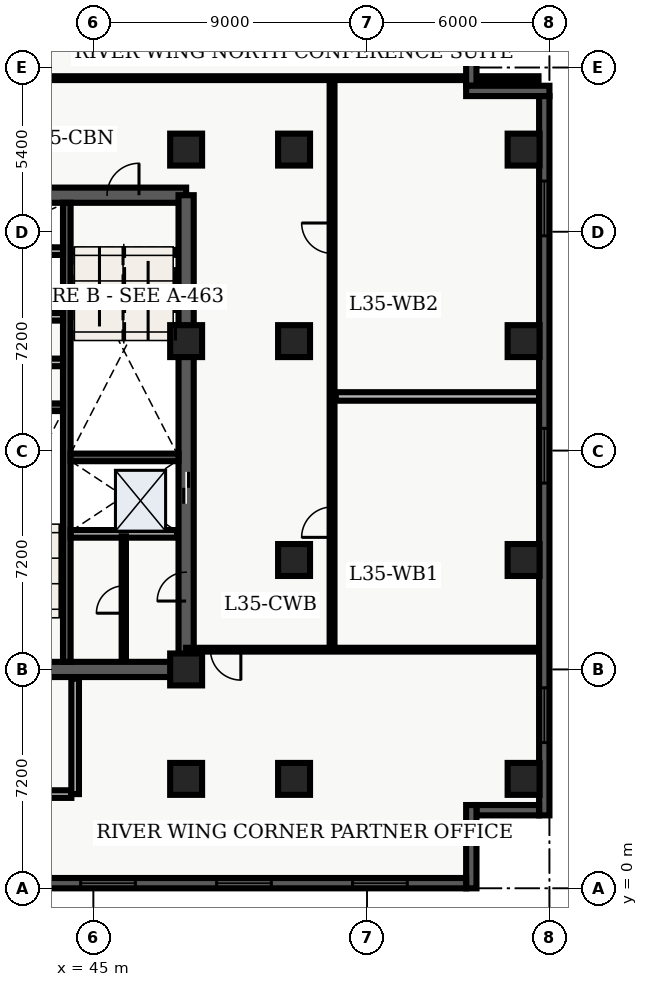
"""IFC4 building model, lengths in metres.
Left out: names, types, materials, properties, quantities, classifications, styles, units other than length and angle.
Written with IfcOpenShell. Run it as: python <this file> out.ifc"""

import sys

from ifc_helpers import new_model, entity, si_unit, converted_unit, direction, frame, origin_with_axes, origin_2d_with_axis, place, context, subcontext, project, spatial, polyline, rectangle, outline, extrude, element, fill, save


model = new_model("IFC4")
c1 = context("Model", 3, precision=1e-05, world=origin_with_axes(), true_north=direction((0.0, 1.0)))
c2 = subcontext(c1, "Body", "Model", "MODEL_VIEW")
j1 = project(units=[si_unit("LENGTHUNIT", "METRE"), converted_unit("PLANEANGLEUNIT", "DEGREE", entity("IfcPlaneAngleMeasure", 0.017), si_unit("PLANEANGLEUNIT", "RADIAN"), dimensions=[0, 0, 0, 0, 0, 0, 0])], contexts=[c1])
p1 = place(None, origin_with_axes())
s1 = spatial("IfcSite", under=j1, at=p1, CompositionType="ELEMENT")
p2 = place(p1, origin_with_axes())
s2 = spatial("IfcBuilding", under=s1, at=p2, CompositionType="ELEMENT")
p3 = place(p2, frame((0.0, 0.0, 144.6), z_axis=(0.0, 0.0, 1.0), x_axis=(1.0, 0.0, 0.0)))
s3 = spatial("IfcBuildingStorey", under=s2, at=p3, CompositionType="ELEMENT", Elevation=144.6)
p4 = place(p3, frame((40.2, 7.2, 0.0), z_axis=(0.0, 0.0, 1.0), x_axis=(1.0, 0.0, 0.0)))
e1 = element("IfcWall", 1, at=p4, inside=s3, PredefinedType="SHEAR", context=c2, shape_type="SweptSolid", body=[
    extrude(outline(polyline([(0.0, -0.25), (7.85, -0.25), (7.85, 0.25), (0.0, 0.25), (0.0, -0.25)])), origin_with_axes(), (0.0, 0.0, 1.0), 3.66),
])
p5 = place(p4, frame((2.175, 0.0, 0.0), z_axis=(0.0, 0.0, 1.0), x_axis=(1.0, 0.0, 0.0)))
e2 = element("IfcOpeningElement", 2, at=p5, cuts=e1, PredefinedType="OPENING", context=c2, shape_type="SweptSolid", body=[
    extrude(rectangle(XDim=1.05, YDim=0.52, at=origin_2d_with_axis()), origin_with_axes(), (0.0, 0.0, 1.0), 2.15),
])
p6 = place(p3, frame((40.2, 22.8, 0.0), z_axis=(0.0, 0.0, 1.0), x_axis=(1.0, 0.0, 0.0)))
e3 = element("IfcWall", 3, at=p6, inside=s3, PredefinedType="SHEAR", context=c2, shape_type="SweptSolid", body=[
    extrude(outline(polyline([(0.0, -0.25), (7.85, -0.25), (7.85, 0.25), (0.0, 0.25), (0.0, -0.25)])), origin_with_axes(), (0.0, 0.0, 1.0), 3.66),
])
p7 = place(p6, frame((5.775, 0.0, 0.0), z_axis=(0.0, 0.0, 1.0), x_axis=(1.0, 0.0, 0.0)))
e4 = element("IfcOpeningElement", 4, at=p7, cuts=e3, PredefinedType="OPENING", context=c2, shape_type="SweptSolid", body=[
    extrude(rectangle(XDim=1.05, YDim=0.52, at=origin_2d_with_axis()), origin_with_axes(), (0.0, 0.0, 1.0), 2.15),
])
p8 = place(p3, frame((48.05, 7.2, 0.0), z_axis=(0.0, 0.0, 1.0), x_axis=(0.0, 1.0, 0.0)))
e5 = element("IfcWall", 5, at=p8, inside=s3, PredefinedType="SHEAR", context=c2, shape_type="SweptSolid", body=[
    extrude(outline(polyline([(0.0, -0.25), (15.6, -0.25), (15.6, 0.25), (0.0, 0.25), (0.0, -0.25)])), origin_with_axes(), (0.0, 0.0, 1.0), 3.66),
])
p9 = place(p8, frame((5.975, 0.0, 0.0), z_axis=(0.0, 0.0, 1.0), x_axis=(1.0, 0.0, 0.0)))
e6 = element("IfcOpeningElement", 6, at=p9, cuts=e5, PredefinedType="OPENING", context=c2, shape_type="SweptSolid", body=[
    extrude(rectangle(XDim=1.05, YDim=0.52, at=origin_2d_with_axis()), origin_with_axes(), (0.0, 0.0, 1.0), 2.15),
])
p10 = place(p8, frame((2.725, 0.0, 0.0), z_axis=(0.0, 0.0, 1.0), x_axis=(1.0, 0.0, 0.0)))
e7 = element("IfcOpeningElement", 7, at=p10, cuts=e5, PredefinedType="OPENING", context=c2, shape_type="SweptSolid", body=[
    extrude(rectangle(XDim=0.95, YDim=0.52, at=origin_2d_with_axis()), origin_with_axes(), (0.0, 0.0, 1.0), 2.15),
])
p11 = place(p3, frame((44.125, 7.45, 0.0), z_axis=(0.0, 0.0, 1.0), x_axis=(0.0, 1.0, 0.0)))
e8 = element("IfcWall", 8, at=p11, inside=s3, PredefinedType="SHEAR", context=c2, shape_type="SweptSolid", body=[
    extrude(outline(polyline([(0.0, -0.125), (15.1, -0.125), (15.1, 0.125), (0.0, 0.125), (0.0, -0.125)])), origin_with_axes(), (0.0, 0.0, 1.0), 3.66),
])
for number, where, z_axis, x_axis in (
    (9, (40.45, 15.825, 0.0), (0.0, 0.0, 1.0), (1.0, 0.0, 0.0)),
    (10, (44.25, 14.175, 0.0), (0.0, 0.0, 1.0), (1.0, 0.0, 0.0)),
):
    element("IfcWall", number, at=place(p3, frame(where, z_axis=z_axis, x_axis=x_axis)), inside=s3, PredefinedType="SHEAR", context=c2, shape_type="SweptSolid", body=[
        extrude(outline(polyline([(0.0, -0.125), (3.55, -0.125), (3.55, 0.125), (0.0, 0.125), (0.0, -0.125)])), origin_with_axes(), (0.0, 0.0, 1.0), 3.66),
    ])
p12 = place(p3, frame((40.5, 17.3, 0.0), z_axis=(0.0, 0.0, 1.0), x_axis=(1.0, 0.0, 0.0)))
e11 = element("IfcWall", 11, at=p12, inside=s3, PredefinedType="SOLIDWALL", context=c2, shape_type="SweptSolid", body=[
    extrude(outline(polyline([(0.0, -0.125), (3.5, -0.125), (3.5, 0.125), (0.0, 0.125), (0.0, -0.125)])), origin_with_axes(), (0.0, 0.0, 1.0), 2.7),
])
p13 = place(p12, frame((2.4, 0.0, 0.0), z_axis=(0.0, 0.0, 1.0), x_axis=(1.0, 0.0, 0.0)))
e12 = element("IfcOpeningElement", 12, at=p13, cuts=e11, PredefinedType="OPENING", context=c2, shape_type="SweptSolid", body=[
    extrude(rectangle(XDim=0.9, YDim=0.27, at=origin_2d_with_axis()), origin_with_axes(), (0.0, 0.0, 1.0), 2.15),
])
p14 = place(p3, frame((40.5, 18.8, 0.0), z_axis=(0.0, 0.0, 1.0), x_axis=(1.0, 0.0, 0.0)))
e13 = element("IfcWall", 13, at=p14, inside=s3, PredefinedType="SOLIDWALL", context=c2, shape_type="SweptSolid", body=[
    extrude(outline(polyline([(0.0, -0.125), (3.5, -0.125), (3.5, 0.125), (0.0, 0.125), (0.0, -0.125)])), origin_with_axes(), (0.0, 0.0, 1.0), 2.7),
])
p15 = place(p3, frame((40.325, 3.1, 0.0), z_axis=(0.0, 0.0, 1.0), x_axis=(1.0, 0.0, 0.0)))
e14 = element("IfcWall", 14, at=p15, inside=s3, PredefinedType="SOLIDWALL", context=c2, shape_type="SweptSolid", body=[
    extrude(outline(polyline([(0.0, -0.125), (3.95, -0.125), (3.95, 0.125), (0.0, 0.125), (0.0, -0.125)])), origin_with_axes(), (0.0, 0.0, 1.0), 2.7),
])
p16 = place(p3, frame((44.4, 3.1, 0.0), z_axis=(0.0, 0.0, 1.0), x_axis=(0.0, 1.0, 0.0)))
e15 = element("IfcWall", 15, at=p16, inside=s3, PredefinedType="SOLIDWALL", context=c2, shape_type="SweptSolid", body=[
    extrude(outline(polyline([(0.0, -0.125), (3.8, -0.125), (3.8, 0.125), (0.0, 0.125), (0.0, -0.125)])), origin_with_axes(), (0.0, 0.0, 1.0), 2.7),
])
for number, where, z_axis, x_axis in (
    (16, (48.05, 3.6, 0.0), (0.0, 0.0, 1.0), (1.0, 0.0, 0.0)),
    (17, (48.05, 7.2, 0.0), (0.0, 0.0, 1.0), (1.0, 0.0, 0.0)),
    (18, (48.05, 18.0, 0.0), (0.0, 0.0, 1.0), (1.0, 0.0, 0.0)),
    (19, (48.05, 24.3, 0.0), (0.0, 0.0, 1.0), (1.0, 0.0, 0.0)),
    (20, (51.6, 3.6, 0.0), (0.0, 0.0, 1.0), (1.0, 0.0, 0.0)),
    (21, (51.6, 10.8, 0.0), (0.0, 0.0, 1.0), (1.0, 0.0, 0.0)),
    (22, (51.6, 18.0, 0.0), (0.0, 0.0, 1.0), (1.0, 0.0, 0.0)),
    (23, (51.6, 24.3, 0.0), (0.0, 0.0, 1.0), (1.0, 0.0, 0.0)),
    (24, (59.15, 3.6, 0.0), (0.0, 0.0, 1.0), (1.0, 0.0, 0.0)),
    (25, (59.15, 10.8, 0.0), (0.0, 0.0, 1.0), (1.0, 0.0, 0.0)),
    (26, (59.15, 18.0, 0.0), (0.0, 0.0, 1.0), (1.0, 0.0, 0.0)),
    (27, (59.15, 24.3, 0.0), (0.0, 0.0, 1.0), (1.0, 0.0, 0.0)),
):
    element("IfcColumn", number, at=place(p3, frame(where, z_axis=z_axis, x_axis=x_axis)), inside=s3, PredefinedType="COLUMN", context=c2, shape_type="SweptSolid", body=[
        extrude(rectangle(XDim=1.05, YDim=1.05, at=origin_2d_with_axis()), origin_with_axes(), (0.0, 0.0, 1.0), 3.9),
    ])
for number, where, z_axis, x_axis in (
    (28, (40.5, 20.96, 0.0), (0.0, 0.0, 1.0), (1.0, 0.0, 0.0)),
    (29, (44.25, 11.66, 0.0), (0.0, 0.0, 1.0), (1.0, 0.0, 0.0)),
):
    element("IfcWall", number, at=place(p3, frame(where, z_axis=z_axis, x_axis=x_axis)), inside=s3, PredefinedType="SOLIDWALL", context=c2, shape_type="SweptSolid", body=[
        extrude(outline(polyline([(0.0, -0.125), (3.5, -0.125), (3.5, 0.125), (0.0, 0.125), (0.0, -0.125)])), origin_with_axes(), (0.0, 0.0, 1.0), 2.7),
    ])
p17 = place(p3, frame((46.0, 7.5, 0.0), z_axis=(0.0, 0.0, 1.0), x_axis=(0.0, 1.0, 0.0)))
e30 = element("IfcWall", 30, at=p17, inside=s3, PredefinedType="PARTITIONING", context=c2, shape_type="SweptSolid", body=[
    extrude(outline(polyline([(0.0, -0.07), (4.08, -0.07), (4.08, 0.07), (0.0, 0.07), (0.0, -0.07)])), origin_with_axes(), (0.0, 0.0, 1.0), 2.7),
])
p18 = place(p17, frame((2.0, 0.0, 0.0), z_axis=(0.0, 0.0, 1.0), x_axis=(1.0, 0.0, 0.0)))
e31 = element("IfcOpeningElement", 31, at=p18, cuts=e30, PredefinedType="OPENING", context=c2, shape_type="SweptSolid", body=[
    extrude(rectangle(XDim=0.9, YDim=0.16, at=origin_2d_with_axis()), origin_with_axes(), (0.0, 0.0, 1.0), 2.15),
])
p19 = place(p3, frame((52.85, 7.85, 0.0), z_axis=(0.0, 0.0, 1.0), x_axis=(0.0, 1.0, 0.0)))
e32 = element("IfcWall", 32, at=p19, inside=s3, PredefinedType="PARTITIONING", context=c2, shape_type="SweptSolid", body=[
    extrude(outline(polyline([(0.0, -0.08), (18.8, -0.08), (18.8, 0.08), (0.0, 0.08), (0.0, -0.08)])), origin_with_axes(), (0.0, 0.0, 1.0), 2.7),
])
p20 = place(p19, frame((4.195, 0.0, 0.0), z_axis=(0.0, 0.0, 1.0), x_axis=(1.0, 0.0, 0.0)))
e33 = element("IfcOpeningElement", 33, at=p20, cuts=e32, PredefinedType="OPENING", context=c2, shape_type="SweptSolid", body=[
    extrude(rectangle(XDim=1.0, YDim=0.18, at=origin_2d_with_axis()), origin_with_axes(), (0.0, 0.0, 1.0), 2.15),
])
p21 = place(p19, frame((13.535, 0.0, 0.0), z_axis=(0.0, 0.0, 1.0), x_axis=(1.0, 0.0, 0.0)))
e34 = element("IfcOpeningElement", 34, at=p21, cuts=e32, PredefinedType="OPENING", context=c2, shape_type="SweptSolid", body=[
    extrude(rectangle(XDim=1.0, YDim=0.18, at=origin_2d_with_axis()), origin_with_axes(), (0.0, 0.0, 1.0), 2.15),
])
p22 = place(p3, frame((59.665, 7.85, 0.0), z_axis=(0.0, 0.0, 1.0), x_axis=(-1.0, 0.0, 0.0)))
e35 = element("IfcWall", 35, at=p22, inside=s3, PredefinedType="PARTITIONING", context=c2, shape_type="SweptSolid", body=[
    extrude(outline(polyline([(0.0, -0.062), (11.615, -0.062), (11.615, 0.062), (0.0, 0.062), (0.0, -0.062)])), origin_with_axes(), (0.0, 0.0, 1.0), 2.7),
])
p23 = place(p22, frame((10.315, 0.0, 0.0), z_axis=(0.0, 0.0, 1.0), x_axis=(1.0, 0.0, 0.0)))
e36 = element("IfcOpeningElement", 36, at=p23, cuts=e35, PredefinedType="OPENING", context=c2, shape_type="SweptSolid", body=[
    extrude(rectangle(XDim=1.0, YDim=0.145, at=origin_2d_with_axis()), origin_with_axes(), (0.0, 0.0, 1.0), 2.15),
])
p24 = place(p3, frame((38.735, 26.65, 0.0), z_axis=(0.0, 0.0, 1.0), x_axis=(1.0, 0.0, 0.0)))
e37 = element("IfcWall", 37, at=p24, inside=s3, PredefinedType="PARTITIONING", context=c2, shape_type="SweptSolid", body=[
    extrude(outline(polyline([(0.0, -0.062), (20.905, -0.062), (20.905, 0.062), (0.0, 0.062), (0.0, -0.062)])), origin_with_axes(), (0.0, 0.0, 1.0), 2.7),
])
p25 = place(p24, frame((4.265, 0.0, 0.0), z_axis=(0.0, 0.0, 1.0), x_axis=(1.0, 0.0, 0.0)))
e38 = element("IfcOpeningElement", 38, at=p25, cuts=e37, PredefinedType="OPENING", context=c2, shape_type="SweptSolid", body=[
    extrude(rectangle(XDim=1.0, YDim=0.145, at=origin_2d_with_axis()), origin_with_axes(), (0.0, 0.0, 1.0), 2.15),
])
p26 = place(p3, frame((52.97, 16.18, 0.0), z_axis=(0.0, 0.0, 1.0), x_axis=(1.0, 0.0, 0.0)))
e39 = element("IfcWall", 39, at=p26, inside=s3, PredefinedType="PARTITIONING", context=c2, shape_type="SweptSolid", body=[
    extrude(outline(polyline([(0.0, -0.14), (6.695, -0.14), (6.695, 0.14), (0.0, 0.14), (0.0, -0.14)])), origin_with_axes(), (0.0, 0.0, 1.0), 2.7),
])
p27 = place(p3, frame((57.43, 28.46, 0.0), z_axis=(0.0, 0.0, 1.0), x_axis=(0.0, -1.0, 0.0)))
e40 = element("IfcWall", 40, at=p27, inside=s3, PredefinedType="SOLIDWALL", context=c2, shape_type="SweptSolid", body=[
    extrude(outline(polyline([(0.0, -0.17), (2.06, -0.17), (2.06, 0.17), (0.0, 0.17), (0.0, -0.17)])), origin_with_axes(), (0.0, 0.0, 1.0), 3.66),
])
p28 = place(p3, frame((57.26, 26.23, 0.0), z_axis=(0.0, 0.0, 1.0), x_axis=(1.0, 0.0, 0.0)))
e41 = element("IfcWall", 41, at=p28, inside=s3, PredefinedType="SOLIDWALL", context=c2, shape_type="SweptSolid", body=[
    extrude(outline(polyline([(0.0, -0.17), (2.74, -0.17), (2.74, 0.17), (0.0, 0.17), (0.0, -0.17)])), origin_with_axes(), (0.0, 0.0, 1.0), 3.66),
])
p29 = place(p3, frame((59.83, 26.06, 0.0), z_axis=(0.0, 0.0, 1.0), x_axis=(0.0, -1.0, 0.0)))
e42 = element("IfcWall", 42, at=p29, inside=s3, PredefinedType="SOLIDWALL", context=c2, shape_type="SweptSolid", body=[
    extrude(outline(polyline([(0.0, -0.17), (23.66, -0.17), (23.66, 0.17), (0.0, 0.17), (0.0, -0.17)])), origin_with_axes(), (0.0, 0.0, 1.0), 3.66),
])
p30 = place(p29, frame((3.696, 0.0, 0.45), z_axis=(0.0, 0.0, 1.0), x_axis=(1.0, 0.0, 0.0)))
e43 = element("IfcOpeningElement", 43, at=p30, cuts=e42, PredefinedType="OPENING", context=c2, shape_type="SweptSolid", body=[
    extrude(rectangle(XDim=1.8, YDim=0.36, at=origin_2d_with_axis()), origin_with_axes(), (0.0, 0.0, 1.0), 2.1),
])
p31 = place(p29, frame((11.83, 0.0, 0.45), z_axis=(0.0, 0.0, 1.0), x_axis=(1.0, 0.0, 0.0)))
e44 = element("IfcOpeningElement", 44, at=p31, cuts=e42, PredefinedType="OPENING", context=c2, shape_type="SweptSolid", body=[
    extrude(rectangle(XDim=1.8, YDim=0.36, at=origin_2d_with_axis()), origin_with_axes(), (0.0, 0.0, 1.0), 2.1),
])
p32 = place(p29, frame((20.364, 0.0, 0.45), z_axis=(0.0, 0.0, 1.0), x_axis=(1.0, 0.0, 0.0)))
e45 = element("IfcOpeningElement", 45, at=p32, cuts=e42, PredefinedType="OPENING", context=c2, shape_type="SweptSolid", body=[
    extrude(rectangle(XDim=1.8, YDim=0.36, at=origin_2d_with_axis()), origin_with_axes(), (0.0, 0.0, 1.0), 2.1),
])
p33 = place(p3, frame((59.66, 2.57, 0.0), z_axis=(0.0, 0.0, 1.0), x_axis=(-1.0, 0.0, 0.0)))
e46 = element("IfcWall", 46, at=p33, inside=s3, PredefinedType="SOLIDWALL", context=c2, shape_type="SweptSolid", body=[
    extrude(outline(polyline([(0.0, -0.17), (2.06, -0.17), (2.06, 0.17), (0.0, 0.17), (0.0, -0.17)])), origin_with_axes(), (0.0, 0.0, 1.0), 3.66),
])
p34 = place(p3, frame((57.43, 2.74, 0.0), z_axis=(0.0, 0.0, 1.0), x_axis=(0.0, -1.0, 0.0)))
e47 = element("IfcWall", 47, at=p34, inside=s3, PredefinedType="SOLIDWALL", context=c2, shape_type="SweptSolid", body=[
    extrude(outline(polyline([(0.0, -0.17), (2.74, -0.17), (2.74, 0.17), (0.0, 0.17), (0.0, -0.17)])), origin_with_axes(), (0.0, 0.0, 1.0), 3.66),
])
p35 = place(p3, frame((57.26, 0.17, 0.0), z_axis=(0.0, 0.0, 1.0), x_axis=(-1.0, 0.0, 0.0)))
e48 = element("IfcWall", 48, at=p35, inside=s3, PredefinedType="SOLIDWALL", context=c2, shape_type="SweptSolid", body=[
    extrude(outline(polyline([(0.0, -0.17), (54.86, -0.17), (54.86, 0.17), (0.0, 0.17), (0.0, -0.17)])), origin_with_axes(), (0.0, 0.0, 1.0), 3.66),
])
p36 = place(p35, frame((2.836, 0.0, 0.45), z_axis=(0.0, 0.0, 1.0), x_axis=(1.0, 0.0, 0.0)))
e49 = element("IfcOpeningElement", 49, at=p36, cuts=e48, PredefinedType="OPENING", context=c2, shape_type="SweptSolid", body=[
    extrude(rectangle(XDim=1.8, YDim=0.36, at=origin_2d_with_axis()), origin_with_axes(), (0.0, 0.0, 1.0), 2.1),
])
p37 = place(p35, frame((7.307, 0.0, 0.45), z_axis=(0.0, 0.0, 1.0), x_axis=(1.0, 0.0, 0.0)))
e50 = element("IfcOpeningElement", 50, at=p37, cuts=e48, PredefinedType="OPENING", context=c2, shape_type="SweptSolid", body=[
    extrude(rectangle(XDim=1.8, YDim=0.36, at=origin_2d_with_axis()), origin_with_axes(), (0.0, 0.0, 1.0), 2.1),
])
p38 = place(p35, frame((11.779, 0.0, 0.45), z_axis=(0.0, 0.0, 1.0), x_axis=(1.0, 0.0, 0.0)))
e51 = element("IfcOpeningElement", 51, at=p38, cuts=e48, PredefinedType="OPENING", context=c2, shape_type="SweptSolid", body=[
    extrude(rectangle(XDim=1.8, YDim=0.36, at=origin_2d_with_axis()), origin_with_axes(), (0.0, 0.0, 1.0), 2.1),
])
p39 = place(p35, frame((16.251, 0.0, 0.45), z_axis=(0.0, 0.0, 1.0), x_axis=(1.0, 0.0, 0.0)))
e52 = element("IfcOpeningElement", 52, at=p39, cuts=e48, PredefinedType="OPENING", context=c2, shape_type="SweptSolid", body=[
    extrude(rectangle(XDim=1.8, YDim=0.36, at=origin_2d_with_axis()), origin_with_axes(), (0.0, 0.0, 1.0), 2.1),
])
p40 = place(p35, frame((20.723, 0.0, 0.45), z_axis=(0.0, 0.0, 1.0), x_axis=(1.0, 0.0, 0.0)))
e53 = element("IfcOpeningElement", 53, at=p40, cuts=e48, PredefinedType="OPENING", context=c2, shape_type="SweptSolid", body=[
    extrude(rectangle(XDim=1.8, YDim=0.36, at=origin_2d_with_axis()), origin_with_axes(), (0.0, 0.0, 1.0), 2.1),
])
p41 = place(p35, frame((34.138, 0.0, 0.45), z_axis=(0.0, 0.0, 1.0), x_axis=(1.0, 0.0, 0.0)))
e54 = element("IfcOpeningElement", 54, at=p41, cuts=e48, PredefinedType="OPENING", context=c2, shape_type="SweptSolid", body=[
    extrude(rectangle(XDim=1.8, YDim=0.36, at=origin_2d_with_axis()), origin_with_axes(), (0.0, 0.0, 1.0), 2.1),
])
p42 = place(p35, frame((38.609, 0.0, 0.45), z_axis=(0.0, 0.0, 1.0), x_axis=(1.0, 0.0, 0.0)))
e55 = element("IfcOpeningElement", 55, at=p42, cuts=e48, PredefinedType="OPENING", context=c2, shape_type="SweptSolid", body=[
    extrude(rectangle(XDim=1.8, YDim=0.36, at=origin_2d_with_axis()), origin_with_axes(), (0.0, 0.0, 1.0), 2.1),
])
p43 = place(p35, frame((43.081, 0.0, 0.45), z_axis=(0.0, 0.0, 1.0), x_axis=(1.0, 0.0, 0.0)))
e56 = element("IfcOpeningElement", 56, at=p43, cuts=e48, PredefinedType="OPENING", context=c2, shape_type="SweptSolid", body=[
    extrude(rectangle(XDim=1.8, YDim=0.36, at=origin_2d_with_axis()), origin_with_axes(), (0.0, 0.0, 1.0), 2.1),
])
p44 = place(p35, frame((47.553, 0.0, 0.45), z_axis=(0.0, 0.0, 1.0), x_axis=(1.0, 0.0, 0.0)))
e57 = element("IfcOpeningElement", 57, at=p44, cuts=e48, PredefinedType="OPENING", context=c2, shape_type="SweptSolid", body=[
    extrude(rectangle(XDim=1.8, YDim=0.36, at=origin_2d_with_axis()), origin_with_axes(), (0.0, 0.0, 1.0), 2.1),
])
p45 = place(p35, frame((52.024, 0.0, 0.45), z_axis=(0.0, 0.0, 1.0), x_axis=(1.0, 0.0, 0.0)))
e58 = element("IfcOpeningElement", 58, at=p45, cuts=e48, PredefinedType="OPENING", context=c2, shape_type="SweptSolid", body=[
    extrude(rectangle(XDim=1.8, YDim=0.36, at=origin_2d_with_axis()), origin_with_axes(), (0.0, 0.0, 1.0), 2.1),
])
p46 = place(p8, frame((5.975, 0.0, 0.0), z_axis=(0.0, 0.0, 1.0), x_axis=(1.0, 0.0, 0.0)))
e59 = element("IfcDoor", 59, at=p46, inside=s3, OperationType="SLIDING_TO_LEFT", PredefinedType="DOOR", context=c2, shape_type="SweptSolid", body=[
    extrude(rectangle(XDim=1.05, YDim=0.09, at=origin_2d_with_axis()), origin_with_axes(), (0.0, 0.0, 1.0), 2.15),
])
fill(e6, e59)
p47 = place(p6, frame((5.775, 0.0, 0.0), z_axis=(0.0, 0.0, 1.0), x_axis=(1.0, 0.0, 0.0)))
e60 = element("IfcDoor", 60, at=p47, inside=s3, OperationType="SINGLE_SWING_RIGHT", PredefinedType="DOOR", context=c2, shape_type="SweptSolid", body=[
    extrude(rectangle(XDim=1.05, YDim=0.09, at=origin_2d_with_axis()), origin_with_axes(), (0.0, 0.0, 1.0), 2.15),
])
fill(e4, e60)
p48 = place(p17, frame((2.0, 0.0, 0.0), z_axis=(0.0, 0.0, 1.0), x_axis=(1.0, 0.0, 0.0)))
e61 = element("IfcDoor", 61, at=p48, inside=s3, OperationType="SINGLE_SWING_LEFT", PredefinedType="DOOR", context=c2, shape_type="SweptSolid", body=[
    extrude(rectangle(XDim=0.9, YDim=0.084, at=origin_2d_with_axis()), origin_with_axes(), (0.0, 0.0, 1.0), 2.15),
])
fill(e31, e61)
p49 = place(p8, frame((2.725, 0.0, 0.0), z_axis=(0.0, 0.0, 1.0), x_axis=(1.0, 0.0, 0.0)))
e62 = element("IfcDoor", 62, at=p49, inside=s3, OperationType="SINGLE_SWING_LEFT", PredefinedType="DOOR", context=c2, shape_type="SweptSolid", body=[
    extrude(rectangle(XDim=0.95, YDim=0.09, at=origin_2d_with_axis()), origin_with_axes(), (0.0, 0.0, 1.0), 2.15),
])
fill(e7, e62)
p50 = place(p22, frame((10.315, 0.0, 0.0), z_axis=(0.0, 0.0, 1.0), x_axis=(1.0, 0.0, 0.0)))
e63 = element("IfcDoor", 63, at=p50, inside=s3, OperationType="SINGLE_SWING_LEFT", PredefinedType="DOOR", context=c2, shape_type="SweptSolid", body=[
    extrude(rectangle(XDim=1.0, YDim=0.075, at=origin_2d_with_axis()), origin_with_axes(), (0.0, 0.0, 1.0), 2.15),
])
fill(e36, e63)
p51 = place(p19, frame((4.195, 0.0, 0.0), z_axis=(0.0, 0.0, 1.0), x_axis=(1.0, 0.0, 0.0)))
e64 = element("IfcDoor", 64, at=p51, inside=s3, OperationType="SINGLE_SWING_LEFT", PredefinedType="DOOR", context=c2, shape_type="SweptSolid", body=[
    extrude(rectangle(XDim=1.0, YDim=0.09, at=origin_2d_with_axis()), origin_with_axes(), (0.0, 0.0, 1.0), 2.15),
])
fill(e33, e64)
p52 = place(p19, frame((13.535, 0.0, 0.0), z_axis=(0.0, 0.0, 1.0), x_axis=(1.0, 0.0, 0.0)))
e65 = element("IfcDoor", 65, at=p52, inside=s3, OperationType="SINGLE_SWING_RIGHT", PredefinedType="DOOR", context=c2, shape_type="SweptSolid", body=[
    extrude(rectangle(XDim=1.0, YDim=0.09, at=origin_2d_with_axis()), origin_with_axes(), (0.0, 0.0, 1.0), 2.15),
])
fill(e34, e65)
p53 = place(p29, frame((3.696, 0.0, 0.45), z_axis=(0.0, 0.0, 1.0), x_axis=(1.0, 0.0, 0.0)))
e66 = element("IfcWindow", 66, at=p53, inside=s3, PredefinedType="WINDOW", context=c2, shape_type="SweptSolid", body=[
    extrude(rectangle(XDim=1.8, YDim=0.09, at=origin_2d_with_axis()), origin_with_axes(), (0.0, 0.0, 1.0), 2.1),
])
fill(e43, e66)
p54 = place(p29, frame((11.83, 0.0, 0.45), z_axis=(0.0, 0.0, 1.0), x_axis=(1.0, 0.0, 0.0)))
e67 = element("IfcWindow", 67, at=p54, inside=s3, PredefinedType="WINDOW", context=c2, shape_type="SweptSolid", body=[
    extrude(rectangle(XDim=1.8, YDim=0.09, at=origin_2d_with_axis()), origin_with_axes(), (0.0, 0.0, 1.0), 2.1),
])
fill(e44, e67)
p55 = place(p29, frame((20.364, 0.0, 0.45), z_axis=(0.0, 0.0, 1.0), x_axis=(1.0, 0.0, 0.0)))
e68 = element("IfcWindow", 68, at=p55, inside=s3, PredefinedType="WINDOW", context=c2, shape_type="SweptSolid", body=[
    extrude(rectangle(XDim=1.8, YDim=0.09, at=origin_2d_with_axis()), origin_with_axes(), (0.0, 0.0, 1.0), 2.1),
])
fill(e45, e68)
p56 = place(p35, frame((2.836, 0.0, 0.45), z_axis=(0.0, 0.0, 1.0), x_axis=(1.0, 0.0, 0.0)))
e69 = element("IfcWindow", 69, at=p56, inside=s3, PredefinedType="WINDOW", context=c2, shape_type="SweptSolid", body=[
    extrude(rectangle(XDim=1.8, YDim=0.09, at=origin_2d_with_axis()), origin_with_axes(), (0.0, 0.0, 1.0), 2.1),
])
fill(e49, e69)
p57 = place(p35, frame((7.307, 0.0, 0.45), z_axis=(0.0, 0.0, 1.0), x_axis=(1.0, 0.0, 0.0)))
e70 = element("IfcWindow", 70, at=p57, inside=s3, PredefinedType="WINDOW", context=c2, shape_type="SweptSolid", body=[
    extrude(rectangle(XDim=1.8, YDim=0.09, at=origin_2d_with_axis()), origin_with_axes(), (0.0, 0.0, 1.0), 2.1),
])
fill(e50, e70)
p58 = place(p35, frame((11.779, 0.0, 0.45), z_axis=(0.0, 0.0, 1.0), x_axis=(1.0, 0.0, 0.0)))
e71 = element("IfcWindow", 71, at=p58, inside=s3, PredefinedType="WINDOW", context=c2, shape_type="SweptSolid", body=[
    extrude(rectangle(XDim=1.8, YDim=0.09, at=origin_2d_with_axis()), origin_with_axes(), (0.0, 0.0, 1.0), 2.1),
])
fill(e51, e71)
save(model, sys.argv[1])
